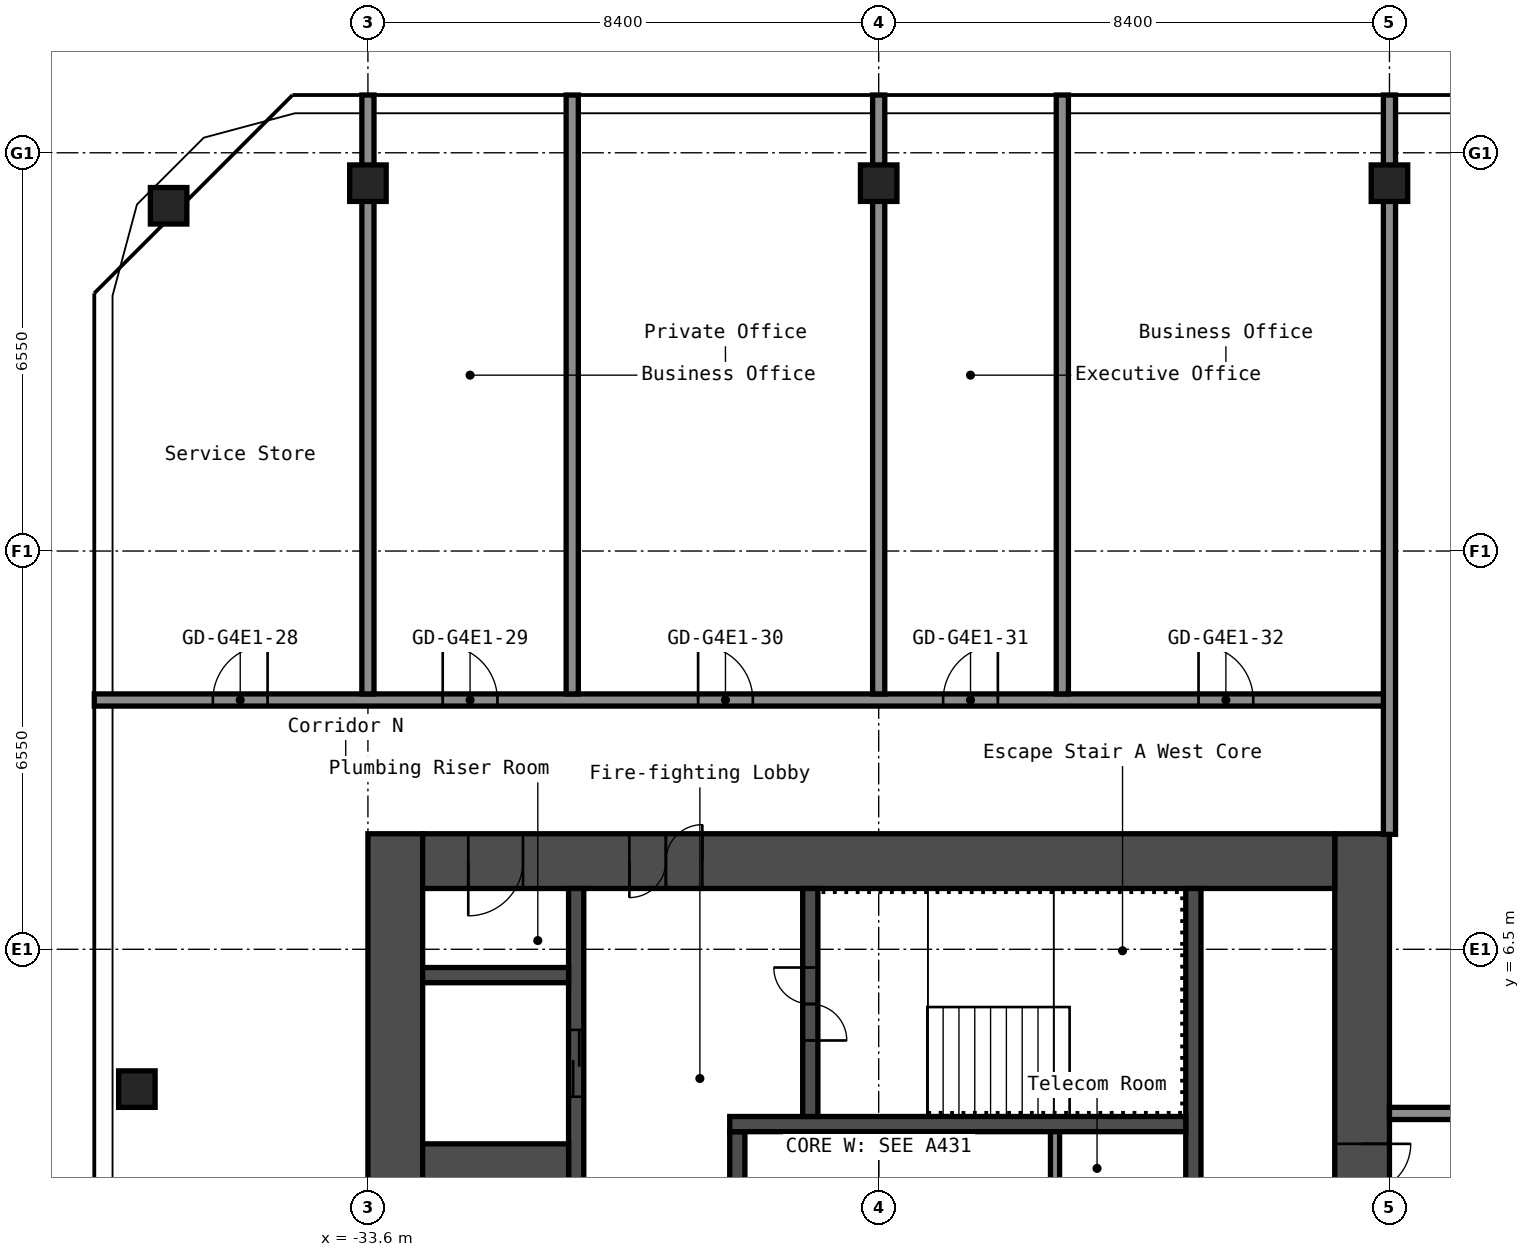
"""IFC4 building model, lengths in metres.
Left out: names, types, materials, properties, quantities, classifications, styles, units other than length and angle.
Written with IfcOpenShell. Run it as: python <this file> out.ifc"""

import sys

from ifc_helpers import new_model, si_unit, direction, frame, frame_2d, origin, origin_2d, place, context, subcontext, project, spatial, rectangle, hollow_rectangle, extrude, element, fill, save


model = new_model("IFC4")
c1 = context("Model", 3, precision=1e-05, world=origin(), true_north=direction((0.0, 1.0)))
c2 = subcontext(c1, "Body", "Model", "MODEL_VIEW")
j1 = project(units=[si_unit("LENGTHUNIT", "METRE"), si_unit("PLANEANGLEUNIT", "RADIAN")], contexts=[c1])
p1 = place(None, origin())
s1 = spatial("IfcSite", under=j1, at=p1, CompositionType="ELEMENT")
p2 = place(p1, origin())
s2 = spatial("IfcBuilding", under=s1, at=p2, CompositionType="ELEMENT")
p3 = place(p2, frame((0.0, 0.0, 215.4)))
s3 = spatial("IfcBuildingStorey", under=s2, at=p3, CompositionType="ELEMENT", Elevation=215.4)
for number, where, z_axis, x_axis in (
    (1, (-37.4, 4.2, 0.0), (0.0, 0.0, 1.0), (1.0, 0.0, 0.0)),
    (2, (-36.878, 18.729, 0.0), (0.0, 0.0, 1.0), (1.0, 0.0, 0.0)),
    (3, (-33.6, 19.1, 0.0), (0.0, 0.0, 1.0), (1.0, 0.0, 0.0)),
    (4, (-25.2, 19.1, 0.0), (0.0, 0.0, 1.0), (1.0, 0.0, 0.0)),
    (5, (-16.8, 19.1, 0.0), (0.0, 0.0, 1.0), (1.0, 0.0, 0.0)),
):
    element("IfcColumn", number, at=place(p3, frame(where, z_axis=z_axis, x_axis=x_axis)), inside=s3, PredefinedType="COLUMN", context=c2, shape_type="SweptSolid", body=[
        extrude(hollow_rectangle(XDim=0.6, YDim=0.6, WallThickness=0.025, InnerFilletRadius=0.038, OuterFilletRadius=0.062, at=origin_2d()), origin(), (0.0, 0.0, 1.0), 2.75),
    ])
p4 = place(p3, frame((-17.25, -8.4, 0.0), z_axis=(0.0, 0.0, 1.0), x_axis=(0.0, 1.0, 0.0)))
e6 = element("IfcWall", 6, at=p4, inside=s3, PredefinedType="SHEAR", context=c2, shape_type="SweptSolid", body=[
    extrude(rectangle(XDim=16.8, YDim=0.9, at=frame_2d((8.4, 0.0))), origin(), (0.0, 0.0, 1.0), 2.75),
])
p5 = place(p4, frame((10.1, 0.0, 0.0)))
e7 = element("IfcOpeningElement", 7, at=p5, cuts=e6, PredefinedType="OPENING", context=c2, shape_type="SweptSolid", body=[
    extrude(rectangle(XDim=1.6, YDim=2.1, at=frame_2d((0.8, 1.05))), frame((0.0, 0.46, 0.0), z_axis=(0.0, -1.0, 0.0), x_axis=(1.0, 0.0, 0.0)), (0.0, 0.0, 1.0), 0.92),
])
p6 = place(p3, frame((-33.15, -8.4, 0.0), z_axis=(0.0, 0.0, 1.0), x_axis=(0.0, 1.0, 0.0)))
e8 = element("IfcWall", 8, at=p6, inside=s3, PredefinedType="SHEAR", context=c2, shape_type="SweptSolid", body=[
    extrude(rectangle(XDim=16.8, YDim=0.9, at=frame_2d((8.4, 0.0))), origin(), (0.0, 0.0, 1.0), 2.75),
])
p7 = place(p3, frame((-32.7, 7.95, 0.0), z_axis=(0.0, 0.0, 1.0), x_axis=(1.0, 0.0, 0.0)))
e9 = element("IfcWall", 9, at=p7, inside=s3, PredefinedType="SHEAR", context=c2, shape_type="SweptSolid", body=[
    extrude(rectangle(XDim=15.0, YDim=0.9, at=frame_2d((7.5, 0.0))), origin(), (0.0, 0.0, 1.0), 2.75),
])
p8 = place(p7, frame((3.4, 0.0, 0.0)))
e10 = element("IfcOpeningElement", 10, at=p8, cuts=e9, PredefinedType="OPENING", context=c2, shape_type="SweptSolid", body=[
    extrude(rectangle(XDim=1.2, YDim=2.1, at=frame_2d((0.6, 1.05))), frame((0.0, 0.46, 0.0), z_axis=(0.0, -1.0, 0.0), x_axis=(1.0, 0.0, 0.0)), (0.0, 0.0, 1.0), 0.92),
])
p9 = place(p7, frame((0.75, 0.0, 0.0)))
e11 = element("IfcOpeningElement", 11, at=p9, cuts=e9, PredefinedType="OPENING", context=c2, shape_type="SweptSolid", body=[
    extrude(rectangle(XDim=0.9, YDim=2.1, at=frame_2d((0.45, 1.05))), frame((0.0, 0.46, 0.0), z_axis=(0.0, -1.0, 0.0), x_axis=(1.0, 0.0, 0.0)), (0.0, 0.0, 1.0), 0.92),
])
p10 = place(p3, frame((-20.025, 1.2, 0.0), z_axis=(0.0, 0.0, 1.0), x_axis=(0.0, 1.0, 0.0)))
e12 = element("IfcWall", 12, at=p10, inside=s3, PredefinedType="SHEAR", context=c2, shape_type="SweptSolid", body=[
    extrude(rectangle(XDim=6.3, YDim=0.25, at=frame_2d((3.15, 0.0))), origin(), (0.0, 0.0, 1.0), 2.75),
])
p11 = place(p3, frame((-27.525, 1.45, 0.0), z_axis=(0.0, 0.0, 1.0), x_axis=(0.0, 1.0, 0.0)))
e13 = element("IfcWall", 13, at=p11, inside=s3, PredefinedType="SHEAR", context=c2, shape_type="SweptSolid", body=[
    extrude(rectangle(XDim=2.05, YDim=0.25, at=frame_2d((1.025, 0.0))), origin(), (0.0, 0.0, 1.0), 2.75),
])
p12 = place(p3, frame((-27.65, 3.625, 0.0), z_axis=(0.0, 0.0, 1.0), x_axis=(1.0, 0.0, 0.0)))
e14 = element("IfcWall", 14, at=p12, inside=s3, PredefinedType="SHEAR", context=c2, shape_type="SweptSolid", body=[
    extrude(rectangle(XDim=7.5, YDim=0.25, at=frame_2d((3.75, 0.0))), origin(), (0.0, 0.0, 1.0), 2.75),
])
p13 = place(p3, frame((-26.325, 3.75, 0.0), z_axis=(0.0, 0.0, 1.0), x_axis=(0.0, 1.0, 0.0)))
e15 = element("IfcWall", 15, at=p13, inside=s3, PredefinedType="SHEAR", context=c2, shape_type="SweptSolid", body=[
    extrude(rectangle(XDim=3.75, YDim=0.25, at=frame_2d((1.875, 0.0))), origin(), (0.0, 0.0, 1.0), 2.75),
])
p14 = place(p13, frame((1.25, 0.0, 0.0)))
e16 = element("IfcOpeningElement", 16, at=p14, cuts=e15, PredefinedType="OPENING", context=c2, shape_type="SweptSolid", body=[
    extrude(rectangle(XDim=1.2, YDim=2.1, at=frame_2d((0.6, 1.05))), frame((0.0, 0.135, 0.0), z_axis=(0.0, -1.0, 0.0), x_axis=(1.0, 0.0, 0.0)), (0.0, 0.0, 1.0), 0.27),
])
p15 = place(p3, frame((-30.175, 1.45, 0.0), z_axis=(0.0, 0.0, 1.0), x_axis=(0.0, 1.0, 0.0)))
e17 = element("IfcWall", 17, at=p15, inside=s3, PredefinedType="SHEAR", context=c2, shape_type="SweptSolid", body=[
    extrude(rectangle(XDim=6.05, YDim=0.25, at=frame_2d((3.025, 0.0))), origin(), (0.0, 0.0, 1.0), 2.75),
])
p16 = place(p15, frame((2.625, 0.0, 0.0)))
e18 = element("IfcOpeningElement", 18, at=p16, cuts=e17, PredefinedType="OPENING", context=c2, shape_type="SweptSolid", body=[
    extrude(rectangle(XDim=1.1, YDim=2.1, at=frame_2d((0.55, 1.05))), frame((0.0, 0.135, 0.0), z_axis=(0.0, -1.0, 0.0), x_axis=(1.0, 0.0, 0.0)), (0.0, 0.0, 1.0), 0.27),
])
p17 = place(p3, frame((-32.7, 2.375, 0.0), z_axis=(0.0, 0.0, 1.0), x_axis=(1.0, 0.0, 0.0)))
e19 = element("IfcWall", 19, at=p17, inside=s3, PredefinedType="SHEAR", context=c2, shape_type="SweptSolid", body=[
    extrude(rectangle(XDim=2.4, YDim=1.85, at=frame_2d((1.2, 0.0))), origin(), (0.0, 0.0, 1.0), 2.75),
])
p18 = place(p3, frame((-32.7, 6.075, 0.0), z_axis=(0.0, 0.0, 1.0), x_axis=(1.0, 0.0, 0.0)))
e20 = element("IfcWall", 20, at=p18, inside=s3, PredefinedType="SHEAR", context=c2, shape_type="SweptSolid", body=[
    extrude(rectangle(XDim=2.4, YDim=0.25, at=frame_2d((1.2, 0.0))), origin(), (0.0, 0.0, 1.0), 2.75),
])
p19 = place(p3, frame((-22.3, 1.45, 0.0), z_axis=(0.0, 0.0, 1.0), x_axis=(0.0, 1.0, 0.0)))
e21 = element("IfcWall", 21, at=p19, inside=s3, PredefinedType="PARTITIONING", context=c2, shape_type="SweptSolid", body=[
    extrude(rectangle(XDim=2.05, YDim=0.15, at=frame_2d((1.025, 0.0))), origin(), (0.0, 0.0, 1.0), 2.75),
])
p20 = place(p3, frame((-16.8, 3.8, 0.0), z_axis=(0.0, 0.0, 1.0), x_axis=(1.0, 0.0, 0.0)))
e22 = element("IfcWall", 22, at=p20, inside=s3, PredefinedType="PARTITIONING", context=c2, shape_type="SweptSolid", body=[
    extrude(rectangle(XDim=33.6, YDim=0.2, at=frame_2d((16.8, 0.0))), origin(), (0.0, 0.0, 1.0), 2.75),
])
p21 = place(p20, frame((1.9, 0.0, 0.0)))
e23 = element("IfcOpeningElement", 23, at=p21, cuts=e22, PredefinedType="OPENING", context=c2, shape_type="SweptSolid", body=[
    extrude(rectangle(XDim=1.0, YDim=2.1, at=frame_2d((0.5, 1.05))), frame((0.0, 0.11, 0.0), z_axis=(0.0, -1.0, 0.0), x_axis=(1.0, 0.0, 0.0)), (0.0, 0.0, 1.0), 0.22),
])
p22 = place(p20, frame((10.0, 0.0, 0.0)))
e24 = element("IfcOpeningElement", 24, at=p22, cuts=e22, PredefinedType="OPENING", context=c2, shape_type="SweptSolid", body=[
    extrude(rectangle(XDim=1.0, YDim=2.1, at=frame_2d((0.5, 1.05))), frame((0.0, 0.11, 0.0), z_axis=(0.0, -1.0, 0.0), x_axis=(1.0, 0.0, 0.0)), (0.0, 0.0, 1.0), 0.22),
])
p23 = place(p20, frame((18.4, 0.0, 0.0)))
e25 = element("IfcOpeningElement", 25, at=p23, cuts=e22, PredefinedType="OPENING", context=c2, shape_type="SweptSolid", body=[
    extrude(rectangle(XDim=1.0, YDim=2.1, at=frame_2d((0.5, 1.05))), frame((0.0, 0.11, 0.0), z_axis=(0.0, -1.0, 0.0), x_axis=(1.0, 0.0, 0.0)), (0.0, 0.0, 1.0), 0.22),
])
p24 = place(p20, frame((26.8, 0.0, 0.0)))
e26 = element("IfcOpeningElement", 26, at=p24, cuts=e22, PredefinedType="OPENING", context=c2, shape_type="SweptSolid", body=[
    extrude(rectangle(XDim=1.0, YDim=2.1, at=frame_2d((0.5, 1.05))), frame((0.0, 0.11, 0.0), z_axis=(0.0, -1.0, 0.0), x_axis=(1.0, 0.0, 0.0)), (0.0, 0.0, 1.0), 0.22),
])
p25 = place(p3, frame((-38.1, 10.6, 0.0), z_axis=(0.0, 0.0, 1.0), x_axis=(1.0, 0.0, 0.0)))
e27 = element("IfcWall", 27, at=p25, inside=s3, PredefinedType="PARTITIONING", context=c2, shape_type="SweptSolid", body=[
    extrude(rectangle(XDim=21.3, YDim=0.2, at=frame_2d((10.65, 0.0))), origin(), (0.0, 0.0, 1.0), 2.75),
])
p26 = place(p25, frame((1.95, 0.0, 0.0)))
e28 = element("IfcOpeningElement", 28, at=p26, cuts=e27, PredefinedType="OPENING", context=c2, shape_type="SweptSolid", body=[
    extrude(rectangle(XDim=0.9, YDim=2.1, at=frame_2d((0.45, 1.05))), frame((0.0, 0.11, 0.0), z_axis=(0.0, -1.0, 0.0), x_axis=(1.0, 0.0, 0.0)), (0.0, 0.0, 1.0), 0.22),
])
p27 = place(p25, frame((5.73, 0.0, 0.0)))
e29 = element("IfcOpeningElement", 29, at=p27, cuts=e27, PredefinedType="OPENING", context=c2, shape_type="SweptSolid", body=[
    extrude(rectangle(XDim=0.9, YDim=2.1, at=frame_2d((0.45, 1.05))), frame((0.0, 0.11, 0.0), z_axis=(0.0, -1.0, 0.0), x_axis=(1.0, 0.0, 0.0)), (0.0, 0.0, 1.0), 0.22),
])
p28 = place(p25, frame((9.93, 0.0, 0.0)))
e30 = element("IfcOpeningElement", 30, at=p28, cuts=e27, PredefinedType="OPENING", context=c2, shape_type="SweptSolid", body=[
    extrude(rectangle(XDim=0.9, YDim=2.1, at=frame_2d((0.45, 1.05))), frame((0.0, 0.11, 0.0), z_axis=(0.0, -1.0, 0.0), x_axis=(1.0, 0.0, 0.0)), (0.0, 0.0, 1.0), 0.22),
])
p29 = place(p25, frame((13.96, 0.0, 0.0)))
e31 = element("IfcOpeningElement", 31, at=p29, cuts=e27, PredefinedType="OPENING", context=c2, shape_type="SweptSolid", body=[
    extrude(rectangle(XDim=0.9, YDim=2.1, at=frame_2d((0.45, 1.05))), frame((0.0, 0.11, 0.0), z_axis=(0.0, -1.0, 0.0), x_axis=(1.0, 0.0, 0.0)), (0.0, 0.0, 1.0), 0.22),
])
p30 = place(p25, frame((18.16, 0.0, 0.0)))
e32 = element("IfcOpeningElement", 32, at=p30, cuts=e27, PredefinedType="OPENING", context=c2, shape_type="SweptSolid", body=[
    extrude(rectangle(XDim=0.9, YDim=2.1, at=frame_2d((0.45, 1.05))), frame((0.0, 0.11, 0.0), z_axis=(0.0, -1.0, 0.0), x_axis=(1.0, 0.0, 0.0)), (0.0, 0.0, 1.0), 0.22),
])
for number, where, z_axis, x_axis in (
    (33, (-33.6, 10.7, 0.0), (0.0, 0.0, 1.0), (0.0, 1.0, 0.0)),
    (34, (-30.24, 10.7, 0.0), (0.0, 0.0, 1.0), (0.0, 1.0, 0.0)),
    (35, (-25.2, 10.7, 0.0), (0.0, 0.0, 1.0), (0.0, 1.0, 0.0)),
    (36, (-22.18, 10.7, 0.0), (0.0, 0.0, 1.0), (0.0, 1.0, 0.0)),
):
    element("IfcWall", number, at=place(p3, frame(where, z_axis=z_axis, x_axis=x_axis)), inside=s3, PredefinedType="PARTITIONING", context=c2, shape_type="SweptSolid", body=[
        extrude(rectangle(XDim=9.85, YDim=0.2, at=frame_2d((4.925, 0.0))), origin(), (0.0, 0.0, 1.0), 2.75),
    ])
p31 = place(p3, frame((-16.8, 8.39, 0.0), z_axis=(0.0, 0.0, 1.0), x_axis=(0.0, 1.0, 0.0)))
e37 = element("IfcWall", 37, at=p31, inside=s3, PredefinedType="PARTITIONING", context=c2, shape_type="SweptSolid", body=[
    extrude(rectangle(XDim=12.16, YDim=0.2, at=frame_2d((6.08, 0.0))), origin(), (0.0, 0.0, 1.0), 2.75),
])
p32 = place(p5, origin())
e38 = element("IfcDoor", 38, at=p32, inside=s3, OperationType="DOUBLE_DOOR_SINGLE_SWING", PredefinedType="DOOR", context=c2, shape_type="SweptSolid", body=[
    extrude(rectangle(XDim=1.6, YDim=2.1, at=frame_2d((0.8, 1.05))), frame((0.0, 0.025, 0.0), z_axis=(0.0, -1.0, 0.0), x_axis=(1.0, 0.0, 0.0)), (0.0, 0.0, 1.0), 0.05),
])
fill(e7, e38)
p33 = place(p8, origin())
e39 = element("IfcDoor", 39, at=p33, inside=s3, OperationType="DOUBLE_DOOR_SINGLE_SWING", PredefinedType="DOOR", context=c2, shape_type="SweptSolid", body=[
    extrude(rectangle(XDim=1.2, YDim=2.1, at=frame_2d((0.6, 1.05))), frame((0.0, 0.025, 0.0), z_axis=(0.0, -1.0, 0.0), x_axis=(1.0, 0.0, 0.0)), (0.0, 0.0, 1.0), 0.05),
])
fill(e10, e39)
p34 = place(p9, origin())
e40 = element("IfcDoor", 40, at=p34, inside=s3, OperationType="SINGLE_SWING_LEFT", PredefinedType="DOOR", context=c2, shape_type="SweptSolid", body=[
    extrude(rectangle(XDim=0.9, YDim=2.1, at=frame_2d((0.45, 1.05))), frame((0.0, 0.025, 0.0), z_axis=(0.0, -1.0, 0.0), x_axis=(1.0, 0.0, 0.0)), (0.0, 0.0, 1.0), 0.05),
])
fill(e11, e40)
p35 = place(p14, origin())
e41 = element("IfcDoor", 41, at=p35, inside=s3, OperationType="DOUBLE_DOOR_SINGLE_SWING", PredefinedType="DOOR", context=c2, shape_type="SweptSolid", body=[
    extrude(rectangle(XDim=1.2, YDim=2.1, at=frame_2d((0.6, 1.05))), frame((0.0, 0.025, 0.0), z_axis=(0.0, -1.0, 0.0), x_axis=(1.0, 0.0, 0.0)), (0.0, 0.0, 1.0), 0.05),
])
fill(e16, e41)
p36 = place(p16, origin())
e42 = element("IfcDoor", 42, at=p36, inside=s3, OperationType="DOUBLE_DOOR_SLIDING", PredefinedType="DOOR", context=c2, shape_type="SweptSolid", body=[
    extrude(rectangle(XDim=1.1, YDim=2.1, at=frame_2d((0.55, 1.05))), frame((0.0, 0.025, 0.0), z_axis=(0.0, -1.0, 0.0), x_axis=(1.0, 0.0, 0.0)), (0.0, 0.0, 1.0), 0.05),
])
fill(e18, e42)
p37 = place(p26, origin())
e43 = element("IfcDoor", 43, at=p37, inside=s3, OperationType="SINGLE_SWING_LEFT", PredefinedType="DOOR", context=c2, shape_type="SweptSolid", body=[
    extrude(rectangle(XDim=0.9, YDim=2.1, at=frame_2d((0.45, 1.05))), frame((0.0, 0.025, 0.0), z_axis=(0.0, -1.0, 0.0), x_axis=(1.0, 0.0, 0.0)), (0.0, 0.0, 1.0), 0.05),
])
fill(e28, e43)
p38 = place(p27, origin())
e44 = element("IfcDoor", 44, at=p38, inside=s3, OperationType="SINGLE_SWING_RIGHT", PredefinedType="DOOR", context=c2, shape_type="SweptSolid", body=[
    extrude(rectangle(XDim=0.9, YDim=2.1, at=frame_2d((0.45, 1.05))), frame((0.0, 0.025, 0.0), z_axis=(0.0, -1.0, 0.0), x_axis=(1.0, 0.0, 0.0)), (0.0, 0.0, 1.0), 0.05),
])
fill(e29, e44)
p39 = place(p28, origin())
e45 = element("IfcDoor", 45, at=p39, inside=s3, OperationType="SINGLE_SWING_RIGHT", PredefinedType="DOOR", context=c2, shape_type="SweptSolid", body=[
    extrude(rectangle(XDim=0.9, YDim=2.1, at=frame_2d((0.45, 1.05))), frame((0.0, 0.025, 0.0), z_axis=(0.0, -1.0, 0.0), x_axis=(1.0, 0.0, 0.0)), (0.0, 0.0, 1.0), 0.05),
])
fill(e30, e45)
p40 = place(p29, origin())
e46 = element("IfcDoor", 46, at=p40, inside=s3, OperationType="SINGLE_SWING_LEFT", PredefinedType="DOOR", context=c2, shape_type="SweptSolid", body=[
    extrude(rectangle(XDim=0.9, YDim=2.1, at=frame_2d((0.45, 1.05))), frame((0.0, 0.025, 0.0), z_axis=(0.0, -1.0, 0.0), x_axis=(1.0, 0.0, 0.0)), (0.0, 0.0, 1.0), 0.05),
])
fill(e31, e46)
p41 = place(p30, origin())
e47 = element("IfcDoor", 47, at=p41, inside=s3, OperationType="SINGLE_SWING_RIGHT", PredefinedType="DOOR", context=c2, shape_type="SweptSolid", body=[
    extrude(rectangle(XDim=0.9, YDim=2.1, at=frame_2d((0.45, 1.05))), frame((0.0, 0.025, 0.0), z_axis=(0.0, -1.0, 0.0), x_axis=(1.0, 0.0, 0.0)), (0.0, 0.0, 1.0), 0.05),
])
fill(e32, e47)
save(model, sys.argv[1])
